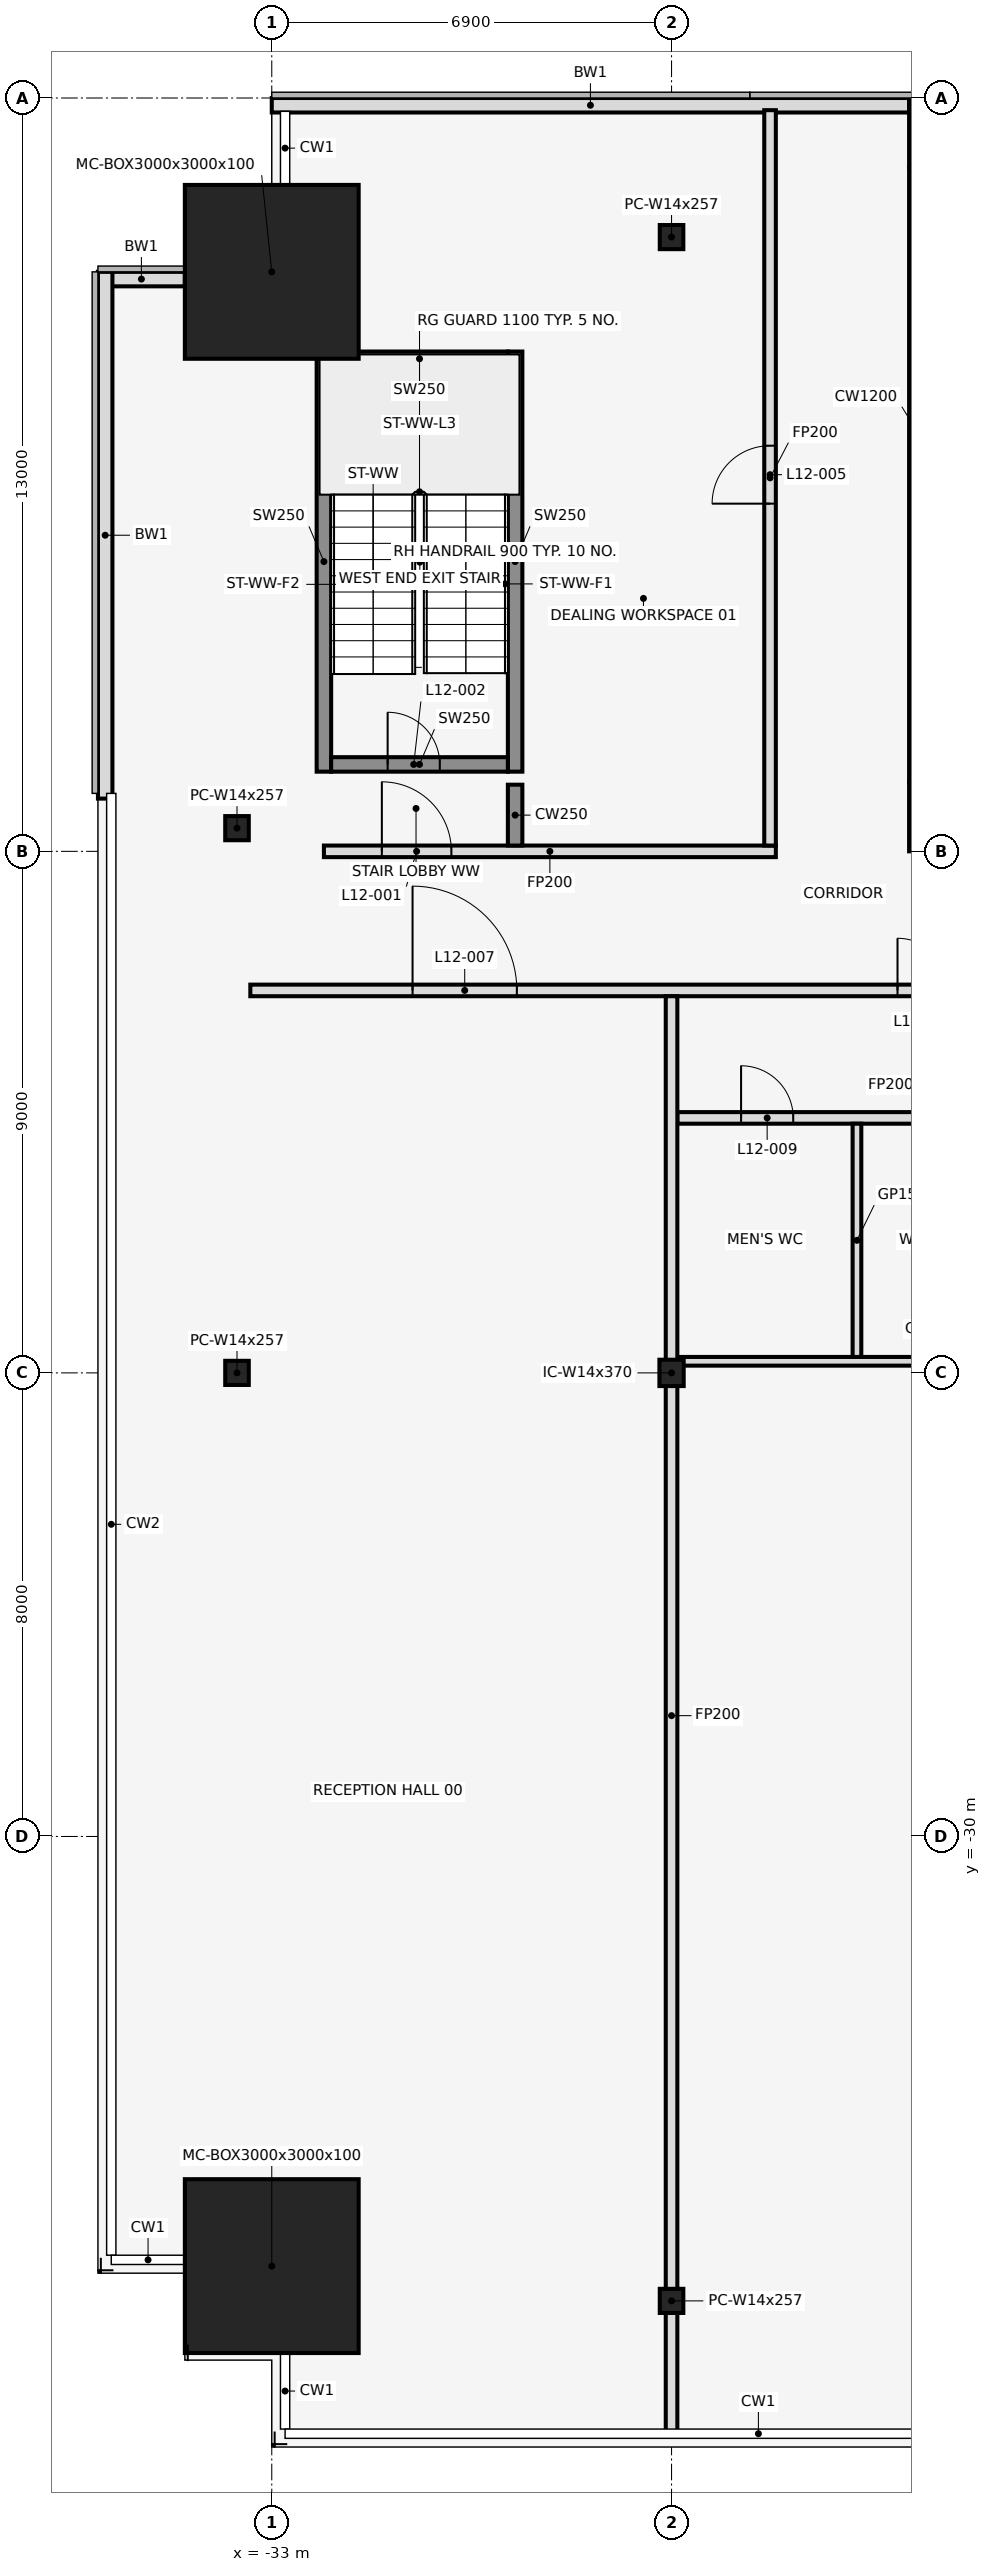
"""IFC4 building model, lengths in metres.
Left out: names, types, materials, properties, quantities, classifications, styles, units other than length and angle.
Written with IfcOpenShell. Run it as: python <this file> out.ifc"""

import sys

from ifc_helpers import new_model, si_unit, direction, frame, frame_2d, origin, origin_2d, place, context, subcontext, project, spatial, rectangle, hollow_rectangle, i_section, extrude, element, fill, save


model = new_model("IFC4")
c1 = context("Model", 3, precision=1e-05, world=origin(), true_north=direction((0.0, 1.0)))
c2 = subcontext(c1, "Body", "Model", "MODEL_VIEW")
j1 = project(units=[si_unit("LENGTHUNIT", "METRE"), si_unit("PLANEANGLEUNIT", "RADIAN")], contexts=[c1])
p1 = place(None, origin())
s1 = spatial("IfcSite", under=j1, at=p1, CompositionType="ELEMENT")
p2 = place(p1, origin())
s2 = spatial("IfcBuilding", under=s1, at=p2, CompositionType="ELEMENT")
p3 = place(p2, frame((0.0, 0.0, 62.0)))
s3 = spatial("IfcBuildingStorey", under=s2, at=p3, CompositionType="ELEMENT", Elevation=62.0)
for number, where, z_axis, x_axis in (
    (1, (-33.0, -37.414, 0.0), (0.0, 0.0, 1.0), (1.0, 0.0, 0.0)),
    (2, (-33.0, -3.0, 0.0), (0.0, 0.0, 1.0), (1.0, 0.0, 0.0)),
):
    element("IfcColumn", number, at=place(p3, frame(where, z_axis=z_axis, x_axis=x_axis)), inside=s3, PredefinedType="COLUMN", context=c2, shape_type="SweptSolid", body=[
        extrude(hollow_rectangle(XDim=3.0, YDim=3.0, WallThickness=0.1, at=origin_2d()), origin(), (0.0, 0.0, 1.0), 4.5),
    ])
for number, where, z_axis, x_axis in (
    (3, (-26.1, -38.014, 0.0), (0.0, 0.0, 1.0), (1.0, 0.0, 0.0)),
    (4, (-26.1, -2.4, 0.0), (0.0, 0.0, 1.0), (1.0, 0.0, 0.0)),
    (5, (-33.6, -12.6, 0.0), (0.0, 0.0, 1.0), (1.0, 0.0, 0.0)),
    (6, (-33.6, -22.0, 0.0), (0.0, 0.0, 1.0), (1.0, 0.0, 0.0)),
):
    element("IfcColumn", number, at=place(p3, frame(where, z_axis=z_axis, x_axis=x_axis)), inside=s3, PredefinedType="COLUMN", context=c2, shape_type="SweptSolid", body=[
        extrude(i_section(OverallWidth=0.406, OverallDepth=0.417, WebThickness=0.03, FlangeThickness=0.048, at=origin_2d()), origin(), (0.0, 0.0, 1.0), 4.5),
    ])
p4 = place(p3, frame((-26.1, -22.0, 0.0), z_axis=(0.0, 0.0, 1.0), x_axis=(1.0, 0.0, 0.0)))
e7 = element("IfcColumn", 7, at=p4, inside=s3, PredefinedType="COLUMN", context=c2, shape_type="SweptSolid", body=[
    extrude(i_section(OverallWidth=0.419, OverallDepth=0.455, WebThickness=0.042, FlangeThickness=0.068, at=origin_2d()), origin(), (0.0, 0.0, 1.0), 4.5),
])
p5 = place(p3, frame((-22.0, -0.125, 0.0), z_axis=(0.0, 0.0, 1.0), x_axis=(-1.0, 0.0, 0.0)))
e8 = element("IfcWall", 8, at=p5, inside=s3, PredefinedType="STANDARD", context=c2, shape_type="SweptSolid", body=[
    extrude(rectangle(XDim=11.0, YDim=0.25, at=frame_2d((5.5, 0.0))), origin(), (0.0, 0.0, 1.0), 4.35),
])
p6 = place(p3, frame((-34.5, -3.125, 0.0), z_axis=(0.0, 0.0, 1.0), x_axis=(-1.0, 0.0, 0.0)))
e9 = element("IfcWall", 9, at=p6, inside=s3, PredefinedType="STANDARD", context=c2, shape_type="SweptSolid", body=[
    extrude(rectangle(XDim=1.5, YDim=0.25, at=frame_2d((0.75, 0.0))), origin(), (0.0, 0.0, 1.0), 4.35),
])
p7 = place(p3, frame((-35.875, -3.0, 0.0), z_axis=(0.0, 0.0, 1.0), x_axis=(0.0, -1.0, 0.0)))
e10 = element("IfcWall", 10, at=p7, inside=s3, PredefinedType="STANDARD", context=c2, shape_type="SweptSolid", body=[
    extrude(rectangle(XDim=9.09, YDim=0.25, at=frame_2d((4.545, 0.0))), origin(), (0.0, 0.0, 1.0), 4.35),
])
for number, where, z_axis, x_axis in (
    (11, (-32.1, -11.625, 0.0), (0.0, 0.0, 1.0), (0.0, 1.0, 0.0)),
    (12, (-28.8, -11.625, 0.0), (0.0, 0.0, 1.0), (0.0, 1.0, 0.0)),
):
    element("IfcWall", number, at=place(p3, frame(where, z_axis=z_axis, x_axis=x_axis)), inside=s3, PredefinedType="SHEAR", context=c2, shape_type="SweptSolid", body=[
        extrude(rectangle(XDim=7.25, YDim=0.25, at=frame_2d((3.625, 0.0))), origin(), (0.0, 0.0, 1.0), 4.5),
    ])
p8 = place(p3, frame((-31.975, -11.5, 0.0), z_axis=(0.0, 0.0, 1.0), x_axis=(1.0, 0.0, 0.0)))
e13 = element("IfcWall", 13, at=p8, inside=s3, PredefinedType="SHEAR", context=c2, shape_type="SweptSolid", body=[
    extrude(rectangle(XDim=3.05, YDim=0.25, at=frame_2d((1.525, 0.0))), origin(), (0.0, 0.0, 1.0), 4.5),
])
p9 = place(p8, frame((0.975, 0.0, 0.0)))
e14 = element("IfcOpeningElement", 14, at=p9, cuts=e13, PredefinedType="OPENING", context=c2, shape_type="SweptSolid", body=[
    extrude(rectangle(XDim=0.9, YDim=2.1, at=frame_2d((0.45, 1.05))), frame((0.0, 0.137, 0.0), z_axis=(0.0, -1.0, 0.0), x_axis=(1.0, 0.0, 0.0)), (0.0, 0.0, 1.0), 0.274),
])
p10 = place(p3, frame((-31.975, -4.5, 0.0), z_axis=(0.0, 0.0, 1.0), x_axis=(1.0, 0.0, 0.0)))
e15 = element("IfcWall", 15, at=p10, inside=s3, PredefinedType="SHEAR", context=c2, shape_type="SweptSolid", body=[
    extrude(rectangle(XDim=3.05, YDim=0.25, at=frame_2d((1.525, 0.0))), origin(), (0.0, 0.0, 1.0), 4.5),
])
p11 = place(p3, frame((-26.0, -21.8, 0.0), z_axis=(0.0, 0.0, 1.0), x_axis=(1.0, 0.0, 0.0)))
e16 = element("IfcWall", 16, at=p11, inside=s3, PredefinedType="PARTITIONING", context=c2, shape_type="SweptSolid", body=[
    extrude(rectangle(XDim=8.7, YDim=0.15, at=frame_2d((4.35, 0.0))), origin(), (0.0, 0.0, 1.0), 3.418),
])
p12 = place(p3, frame((-26.0, -17.6, 0.0), z_axis=(0.0, 0.0, 1.0), x_axis=(1.0, 0.0, 0.0)))
e17 = element("IfcWall", 17, at=p12, inside=s3, PredefinedType="PARTITIONING", context=c2, shape_type="SweptSolid", body=[
    extrude(rectangle(XDim=8.5, YDim=0.2, at=frame_2d((4.25, 0.0))), origin(), (0.0, 0.0, 1.0), 3.418),
])
p13 = place(p12, frame((1.1, 0.0, 0.0)))
e18 = element("IfcOpeningElement", 18, at=p13, cuts=e17, PredefinedType="OPENING", context=c2, shape_type="SweptSolid", body=[
    extrude(rectangle(XDim=0.9, YDim=2.1, at=frame_2d((0.45, 1.05))), frame((0.0, 0.112, 0.0), z_axis=(0.0, -1.0, 0.0), x_axis=(1.0, 0.0, 0.0)), (0.0, 0.0, 1.0), 0.224),
])
p14 = place(p12, frame((4.3, 0.0, 0.0)))
e19 = element("IfcOpeningElement", 19, at=p14, cuts=e17, PredefinedType="OPENING", context=c2, shape_type="SweptSolid", body=[
    extrude(rectangle(XDim=0.9, YDim=2.1, at=frame_2d((0.45, 1.05))), frame((0.0, 0.112, 0.0), z_axis=(0.0, -1.0, 0.0), x_axis=(1.0, 0.0, 0.0)), (0.0, 0.0, 1.0), 0.224),
])
p15 = place(p12, frame((6.9, 0.0, 0.0)))
e20 = element("IfcOpeningElement", 20, at=p15, cuts=e17, PredefinedType="OPENING", context=c2, shape_type="SweptSolid", body=[
    extrude(rectangle(XDim=1.0, YDim=2.1, at=frame_2d((0.5, 1.05))), frame((0.0, 0.112, 0.0), z_axis=(0.0, -1.0, 0.0), x_axis=(1.0, 0.0, 0.0)), (0.0, 0.0, 1.0), 0.224),
])
p16 = place(p3, frame((-33.37, -15.4, 0.0), z_axis=(0.0, 0.0, 1.0), x_axis=(1.0, 0.0, 0.0)))
e21 = element("IfcWall", 21, at=p16, inside=s3, PredefinedType="PARTITIONING", context=c2, shape_type="SweptSolid", body=[
    extrude(rectangle(XDim=66.74, YDim=0.2, at=frame_2d((33.37, 0.0))), origin(), (0.0, 0.0, 1.0), 3.418),
])
p17 = place(p16, frame((2.8, 0.0, 0.0)))
e22 = element("IfcOpeningElement", 22, at=p17, cuts=e21, PredefinedType="OPENING", context=c2, shape_type="SweptSolid", body=[
    extrude(rectangle(XDim=1.8, YDim=2.1, at=frame_2d((0.9, 1.05))), frame((0.0, 0.112, 0.0), z_axis=(0.0, -1.0, 0.0), x_axis=(1.0, 0.0, 0.0)), (0.0, 0.0, 1.0), 0.224),
])
p18 = place(p16, frame((11.17, 0.0, 0.0)))
e23 = element("IfcOpeningElement", 23, at=p18, cuts=e21, PredefinedType="OPENING", context=c2, shape_type="SweptSolid", body=[
    extrude(rectangle(XDim=0.9, YDim=2.1, at=frame_2d((0.45, 1.05))), frame((0.0, 0.112, 0.0), z_axis=(0.0, -1.0, 0.0), x_axis=(1.0, 0.0, 0.0)), (0.0, 0.0, 1.0), 0.224),
])
p19 = place(p16, frame((19.87, 0.0, 0.0)))
e24 = element("IfcOpeningElement", 24, at=p19, cuts=e21, PredefinedType="OPENING", context=c2, shape_type="SweptSolid", body=[
    extrude(rectangle(XDim=1.0, YDim=2.1, at=frame_2d((0.5, 1.05))), frame((0.0, 0.112, 0.0), z_axis=(0.0, -1.0, 0.0), x_axis=(1.0, 0.0, 0.0)), (0.0, 0.0, 1.0), 0.224),
])
p20 = place(p16, frame((26.67, 0.0, 0.0)))
e25 = element("IfcOpeningElement", 25, at=p20, cuts=e21, PredefinedType="OPENING", context=c2, shape_type="SweptSolid", body=[
    extrude(rectangle(XDim=1.8, YDim=2.1, at=frame_2d((0.9, 1.05))), frame((0.0, 0.112, 0.0), z_axis=(0.0, -1.0, 0.0), x_axis=(1.0, 0.0, 0.0)), (0.0, 0.0, 1.0), 0.224),
])
p21 = place(p16, frame((33.87, 0.0, 0.0)))
e26 = element("IfcOpeningElement", 26, at=p21, cuts=e21, PredefinedType="OPENING", context=c2, shape_type="SweptSolid", body=[
    extrude(rectangle(XDim=1.8, YDim=2.1, at=frame_2d((0.9, 1.05))), frame((0.0, 0.112, 0.0), z_axis=(0.0, -1.0, 0.0), x_axis=(1.0, 0.0, 0.0)), (0.0, 0.0, 1.0), 0.224),
])
p22 = place(p16, frame((45.47, 0.0, 0.0)))
e27 = element("IfcOpeningElement", 27, at=p22, cuts=e21, PredefinedType="OPENING", context=c2, shape_type="SweptSolid", body=[
    extrude(rectangle(XDim=1.8, YDim=2.1, at=frame_2d((0.9, 1.05))), frame((0.0, 0.112, 0.0), z_axis=(0.0, -1.0, 0.0), x_axis=(1.0, 0.0, 0.0)), (0.0, 0.0, 1.0), 0.224),
])
p23 = place(p16, frame((57.47, 0.0, 0.0)))
e28 = element("IfcOpeningElement", 28, at=p23, cuts=e21, PredefinedType="OPENING", context=c2, shape_type="SweptSolid", body=[
    extrude(rectangle(XDim=1.0, YDim=2.1, at=frame_2d((0.5, 1.05))), frame((0.0, 0.112, 0.0), z_axis=(0.0, -1.0, 0.0), x_axis=(1.0, 0.0, 0.0)), (0.0, 0.0, 1.0), 0.224),
])
p24 = place(p16, frame((63.57, 0.0, 0.0)))
e29 = element("IfcOpeningElement", 29, at=p24, cuts=e21, PredefinedType="OPENING", context=c2, shape_type="SweptSolid", body=[
    extrude(rectangle(XDim=1.8, YDim=2.1, at=frame_2d((0.9, 1.05))), frame((0.0, 0.112, 0.0), z_axis=(0.0, -1.0, 0.0), x_axis=(1.0, 0.0, 0.0)), (0.0, 0.0, 1.0), 0.224),
])
p25 = place(p3, frame((-32.1, -13.0, 0.0), z_axis=(0.0, 0.0, 1.0), x_axis=(1.0, 0.0, 0.0)))
e30 = element("IfcWall", 30, at=p25, inside=s3, PredefinedType="PARTITIONING", context=c2, shape_type="SweptSolid", body=[
    extrude(rectangle(XDim=7.8, YDim=0.2, at=frame_2d((3.9, 0.0))), origin(), (0.0, 0.0, 1.0), 3.418),
])
p26 = place(p25, frame((1.0, 0.0, 0.0)))
e31 = element("IfcOpeningElement", 31, at=p26, cuts=e30, PredefinedType="OPENING", context=c2, shape_type="SweptSolid", body=[
    extrude(rectangle(XDim=1.2, YDim=2.1, at=frame_2d((0.6, 1.05))), frame((0.0, 0.112, 0.0), z_axis=(0.0, -1.0, 0.0), x_axis=(1.0, 0.0, 0.0)), (0.0, 0.0, 1.0), 0.224),
])
p27 = place(p3, frame((-28.8, -12.9, 0.0), z_axis=(0.0, 0.0, 1.0), x_axis=(0.0, 1.0, 0.0)))
e32 = element("IfcWall", 32, at=p27, inside=s3, PredefinedType="SHEAR", context=c2, shape_type="SweptSolid", body=[
    extrude(rectangle(XDim=1.05, YDim=0.25, at=frame_2d((0.525, 0.0))), origin(), (0.0, 0.0, 1.0), 4.5),
])
p28 = place(p3, frame((-26.1, -40.33, 0.0), z_axis=(0.0, 0.0, 1.0), x_axis=(0.0, 1.0, 0.0)))
e33 = element("IfcWall", 33, at=p28, inside=s3, PredefinedType="PARTITIONING", context=c2, shape_type="SweptSolid", body=[
    extrude(rectangle(XDim=24.83, YDim=0.2, at=frame_2d((12.415, 0.0))), origin(), (0.0, 0.0, 1.0), 3.418),
])
p29 = place(p3, frame((-24.4, -12.9, 0.0), z_axis=(0.0, 0.0, 1.0), x_axis=(0.0, 1.0, 0.0)))
e34 = element("IfcWall", 34, at=p29, inside=s3, PredefinedType="PARTITIONING", context=c2, shape_type="SweptSolid", body=[
    extrude(rectangle(XDim=12.69, YDim=0.2, at=frame_2d((6.345, 0.0))), origin(), (0.0, 0.0, 1.0), 3.418),
])
p30 = place(p29, frame((5.9, 0.0, 0.0)))
e35 = element("IfcOpeningElement", 35, at=p30, cuts=e34, PredefinedType="OPENING", context=c2, shape_type="SweptSolid", body=[
    extrude(rectangle(XDim=1.0, YDim=2.1, at=frame_2d((0.5, 1.05))), frame((0.0, 0.112, 0.0), z_axis=(0.0, -1.0, 0.0), x_axis=(1.0, 0.0, 0.0)), (0.0, 0.0, 1.0), 0.224),
])
p31 = place(p3, frame((-22.9, -21.725, 0.0), z_axis=(0.0, 0.0, 1.0), x_axis=(0.0, 1.0, 0.0)))
e36 = element("IfcWall", 36, at=p31, inside=s3, PredefinedType="PARTITIONING", context=c2, shape_type="SweptSolid", body=[
    extrude(rectangle(XDim=4.025, YDim=0.15, at=frame_2d((2.013, 0.0))), origin(), (0.0, 0.0, 1.0), 3.418),
])
p32 = place(p3, frame((-22.0, -0.6, 0.0), z_axis=(0.0, 0.0, 1.0), x_axis=(1.0, 0.0, 0.0)))
e37 = element("IfcWall", 37, at=p32, inside=s3, PredefinedType="SHEAR", context=c2, shape_type="SweptSolid", body=[
    extrude(rectangle(XDim=44.0, YDim=1.2, at=frame_2d((22.0, 0.0))), origin(), (0.0, 0.0, 1.0), 4.5),
])
p33 = place(p32, frame((18.55, 0.0, 0.0)))
e38 = element("IfcOpeningElement", 38, at=p33, cuts=e37, PredefinedType="OPENING", context=c2, shape_type="SweptSolid", body=[
    extrude(rectangle(XDim=0.9, YDim=2.1, at=frame_2d((0.45, 1.05))), frame((0.0, 0.612, 0.0), z_axis=(0.0, -1.0, 0.0), x_axis=(1.0, 0.0, 0.0)), (0.0, 0.0, 1.0), 1.224),
])
p34 = place(p32, frame((24.55, 0.0, 0.0)))
e39 = element("IfcOpeningElement", 39, at=p34, cuts=e37, PredefinedType="OPENING", context=c2, shape_type="SweptSolid", body=[
    extrude(rectangle(XDim=0.9, YDim=2.1, at=frame_2d((0.45, 1.05))), frame((0.0, 0.612, 0.0), z_axis=(0.0, -1.0, 0.0), x_axis=(1.0, 0.0, 0.0)), (0.0, 0.0, 1.0), 1.224),
])
p35 = place(p3, frame((-22.0, -12.4, 0.0), z_axis=(0.0, 0.0, 1.0), x_axis=(1.0, 0.0, 0.0)))
e40 = element("IfcWall", 40, at=p35, inside=s3, PredefinedType="SHEAR", context=c2, shape_type="SweptSolid", body=[
    extrude(rectangle(XDim=44.0, YDim=1.2, at=frame_2d((22.0, 0.0))), origin(), (0.0, 0.0, 1.0), 4.5),
])
p36 = place(p35, frame((2.2, 0.0, 0.0)))
e41 = element("IfcOpeningElement", 41, at=p36, cuts=e40, PredefinedType="OPENING", context=c2, shape_type="SweptSolid", body=[
    extrude(rectangle(XDim=1.2, YDim=2.1, at=frame_2d((0.6, 1.05))), frame((0.0, 0.612, 0.0), z_axis=(0.0, -1.0, 0.0), x_axis=(1.0, 0.0, 0.0)), (0.0, 0.0, 1.0), 1.224),
])
p37 = place(p35, frame((21.4, 0.0, 0.0)))
e42 = element("IfcOpeningElement", 42, at=p37, cuts=e40, PredefinedType="OPENING", context=c2, shape_type="SweptSolid", body=[
    extrude(rectangle(XDim=1.2, YDim=2.1, at=frame_2d((0.6, 1.05))), frame((0.0, 0.612, 0.0), z_axis=(0.0, -1.0, 0.0), x_axis=(1.0, 0.0, 0.0)), (0.0, 0.0, 1.0), 1.224),
])
p38 = place(p35, frame((40.6, 0.0, 0.0)))
e43 = element("IfcOpeningElement", 43, at=p38, cuts=e40, PredefinedType="OPENING", context=c2, shape_type="SweptSolid", body=[
    extrude(rectangle(XDim=1.2, YDim=2.1, at=frame_2d((0.6, 1.05))), frame((0.0, 0.612, 0.0), z_axis=(0.0, -1.0, 0.0), x_axis=(1.0, 0.0, 0.0)), (0.0, 0.0, 1.0), 1.224),
])
p39 = place(p35, frame((16.0, 0.0, 0.0)))
e44 = element("IfcOpeningElement", 44, at=p39, cuts=e40, PredefinedType="OPENING", context=c2, shape_type="SweptSolid", body=[
    extrude(rectangle(XDim=1.8, YDim=2.1, at=frame_2d((0.9, 1.05))), frame((0.0, 0.612, 0.0), z_axis=(0.0, -1.0, 0.0), x_axis=(1.0, 0.0, 0.0)), (0.0, 0.0, 1.0), 1.224),
])
p40 = place(p35, frame((6.3, 0.0, 0.0)))
e45 = element("IfcOpeningElement", 45, at=p40, cuts=e40, PredefinedType="OPENING", context=c2, shape_type="SweptSolid", body=[
    extrude(rectangle(XDim=1.2, YDim=2.1, at=frame_2d((0.6, 1.05))), frame((0.0, 0.612, 0.0), z_axis=(0.0, -1.0, 0.0), x_axis=(1.0, 0.0, 0.0)), (0.0, 0.0, 1.0), 1.224),
])
p41 = place(p35, frame((26.2, 0.0, 0.0)))
e46 = element("IfcOpeningElement", 46, at=p41, cuts=e40, PredefinedType="OPENING", context=c2, shape_type="SweptSolid", body=[
    extrude(rectangle(XDim=1.8, YDim=2.1, at=frame_2d((0.9, 1.05))), frame((0.0, 0.612, 0.0), z_axis=(0.0, -1.0, 0.0), x_axis=(1.0, 0.0, 0.0)), (0.0, 0.0, 1.0), 1.224),
])
p42 = place(p35, frame((36.5, 0.0, 0.0)))
e47 = element("IfcOpeningElement", 47, at=p42, cuts=e40, PredefinedType="OPENING", context=c2, shape_type="SweptSolid", body=[
    extrude(rectangle(XDim=1.2, YDim=2.1, at=frame_2d((0.6, 1.05))), frame((0.0, 0.612, 0.0), z_axis=(0.0, -1.0, 0.0), x_axis=(1.0, 0.0, 0.0)), (0.0, 0.0, 1.0), 1.224),
])
p43 = place(p3, frame((-21.4, -11.8, 0.0), z_axis=(0.0, 0.0, 1.0), x_axis=(0.0, 1.0, 0.0)))
e48 = element("IfcWall", 48, at=p43, inside=s3, PredefinedType="SHEAR", context=c2, shape_type="SweptSolid", body=[
    extrude(rectangle(XDim=10.6, YDim=1.2, at=frame_2d((5.3, 0.0))), origin(), (0.0, 0.0, 1.0), 4.5),
])
p44 = place(p26, origin())
e49 = element("IfcDoor", 49, at=p44, inside=s3, OperationType="SINGLE_SWING_LEFT", PredefinedType="DOOR", context=c2, shape_type="SweptSolid", body=[
    extrude(rectangle(XDim=1.2, YDim=2.1, at=frame_2d((0.6, 1.05))), frame((0.0, 0.025, 0.0), z_axis=(0.0, -1.0, 0.0), x_axis=(1.0, 0.0, 0.0)), (0.0, 0.0, 1.0), 0.05),
])
fill(e31, e49)
p45 = place(p9, origin())
e50 = element("IfcDoor", 50, at=p45, inside=s3, OperationType="SINGLE_SWING_LEFT", PredefinedType="DOOR", context=c2, shape_type="SweptSolid", body=[
    extrude(rectangle(XDim=0.9, YDim=2.1, at=frame_2d((0.45, 1.05))), frame((0.0, 0.025, 0.0), z_axis=(0.0, -1.0, 0.0), x_axis=(1.0, 0.0, 0.0)), (0.0, 0.0, 1.0), 0.05),
])
fill(e14, e50)
p46 = place(p30, origin())
e51 = element("IfcDoor", 51, at=p46, inside=s3, OperationType="SINGLE_SWING_LEFT", PredefinedType="DOOR", context=c2, shape_type="SweptSolid", body=[
    extrude(rectangle(XDim=1.0, YDim=2.1, at=frame_2d((0.5, 1.05))), frame((0.0, 0.025, 0.0), z_axis=(0.0, -1.0, 0.0), x_axis=(1.0, 0.0, 0.0)), (0.0, 0.0, 1.0), 0.05),
])
fill(e35, e51)
p47 = place(p17, origin())
e52 = element("IfcDoor", 52, at=p47, inside=s3, OperationType="SINGLE_SWING_LEFT", PredefinedType="DOOR", context=c2, shape_type="SweptSolid", body=[
    extrude(rectangle(XDim=1.8, YDim=2.1, at=frame_2d((0.9, 1.05))), frame((0.0, 0.025, 0.0), z_axis=(0.0, -1.0, 0.0), x_axis=(1.0, 0.0, 0.0)), (0.0, 0.0, 1.0), 0.05),
])
fill(e22, e52)
p48 = place(p18, frame((0.9, 0.0, 0.0), z_axis=(0.0, 0.0, 1.0), x_axis=(-1.0, 0.0, 0.0)))
e53 = element("IfcDoor", 53, at=p48, inside=s3, OperationType="SINGLE_SWING_RIGHT", PredefinedType="DOOR", context=c2, shape_type="SweptSolid", body=[
    extrude(rectangle(XDim=0.9, YDim=2.1, at=frame_2d((0.45, 1.05))), frame((0.0, 0.025, 0.0), z_axis=(0.0, -1.0, 0.0), x_axis=(1.0, 0.0, 0.0)), (0.0, 0.0, 1.0), 0.05),
])
fill(e23, e53)
p49 = place(p13, frame((0.9, 0.0, 0.0), z_axis=(0.0, 0.0, 1.0), x_axis=(-1.0, 0.0, 0.0)))
e54 = element("IfcDoor", 54, at=p49, inside=s3, OperationType="SINGLE_SWING_RIGHT", PredefinedType="DOOR", context=c2, shape_type="SweptSolid", body=[
    extrude(rectangle(XDim=0.9, YDim=2.1, at=frame_2d((0.45, 1.05))), frame((0.0, 0.025, 0.0), z_axis=(0.0, -1.0, 0.0), x_axis=(1.0, 0.0, 0.0)), (0.0, 0.0, 1.0), 0.05),
])
fill(e18, e54)
save(model, sys.argv[1])
